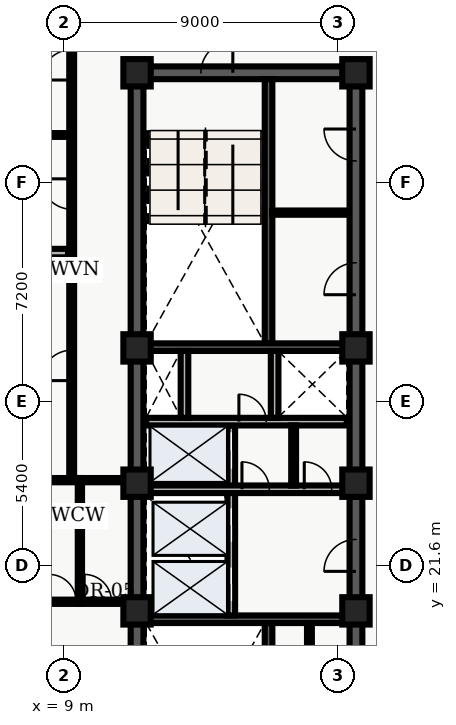
"""IFC4 building model, lengths in metres.
Left out: names, types, materials, properties, quantities, classifications, styles, units other than length and angle.
Written with IfcOpenShell. Run it as: python <this file> out.ifc"""

import sys

from ifc_helpers import new_model, entity, si_unit, converted_unit, direction, frame, origin_with_axes, origin_2d_with_axis, place, context, subcontext, project, spatial, polyline, rectangle, outline, extrude, element, fill, save


model = new_model("IFC4")
c1 = context("Model", 3, precision=1e-05, world=origin_with_axes(), true_north=direction((0.0, 1.0)))
c2 = subcontext(c1, "Body", "Model", "MODEL_VIEW")
j1 = project(units=[si_unit("LENGTHUNIT", "METRE"), converted_unit("PLANEANGLEUNIT", "DEGREE", entity("IfcPlaneAngleMeasure", 0.017), si_unit("PLANEANGLEUNIT", "RADIAN"), dimensions=[0, 0, 0, 0, 0, 0, 0])], contexts=[c1])
p1 = place(None, origin_with_axes())
s1 = spatial("IfcSite", under=j1, at=p1, CompositionType="ELEMENT")
p2 = place(p1, origin_with_axes())
s2 = spatial("IfcBuilding", under=s1, at=p2, CompositionType="ELEMENT")
p3 = place(p2, frame((0.0, 0.0, 240.3), z_axis=(0.0, 0.0, 1.0), x_axis=(1.0, 0.0, 0.0)))
s3 = spatial("IfcBuildingStorey", under=s2, at=p3, CompositionType="ELEMENT", Elevation=240.3)
p4 = place(p3, frame((11.4, 10.8, 0.0), z_axis=(0.0, 0.0, 1.0), x_axis=(0.0, 1.0, 0.0)))
e1 = element("IfcWall", 1, at=p4, inside=s3, PredefinedType="SHEAR", context=c2, shape_type="SweptSolid", body=[
    extrude(outline(polyline([(0.0, -0.21), (27.0, -0.21), (27.0, 0.21), (0.0, 0.21), (0.0, -0.21)])), origin_with_axes(), (0.0, 0.0, 1.0), 3.66),
])
p5 = place(p3, frame((11.4, 37.8, 0.0), z_axis=(0.0, 0.0, 1.0), x_axis=(1.0, 0.0, 0.0)))
e2 = element("IfcWall", 2, at=p5, inside=s3, PredefinedType="SHEAR", context=c2, shape_type="SweptSolid", body=[
    extrude(outline(polyline([(0.0, -0.21), (7.2, -0.21), (7.2, 0.21), (0.0, 0.21), (0.0, -0.21)])), origin_with_axes(), (0.0, 0.0, 1.0), 3.66),
])
p6 = place(p5, frame((2.625, 0.0, 0.0), z_axis=(0.0, 0.0, 1.0), x_axis=(1.0, 0.0, 0.0)))
e3 = element("IfcOpeningElement", 3, at=p6, cuts=e2, PredefinedType="OPENING", context=c2, shape_type="SweptSolid", body=[
    extrude(rectangle(XDim=1.05, YDim=0.44, at=origin_2d_with_axis()), origin_with_axes(), (0.0, 0.0, 1.0), 2.15),
])
p7 = place(p3, frame((18.6, 10.8, 0.0), z_axis=(0.0, 0.0, 1.0), x_axis=(0.0, 1.0, 0.0)))
e4 = element("IfcWall", 4, at=p7, inside=s3, PredefinedType="SHEAR", context=c2, shape_type="SweptSolid", body=[
    extrude(outline(polyline([(0.0, -0.21), (13.5, -0.21), (13.5, 0.21), (0.0, 0.21), (0.0, -0.21)])), origin_with_axes(), (0.0, 0.0, 1.0), 3.66),
])
p8 = place(p7, frame((1.3, 0.0, 0.0), z_axis=(0.0, 0.0, 1.0), x_axis=(1.0, 0.0, 0.0)))
e5 = element("IfcOpeningElement", 5, at=p8, cuts=e4, PredefinedType="OPENING", context=c2, shape_type="SweptSolid", body=[
    extrude(rectangle(XDim=1.1, YDim=0.44, at=origin_2d_with_axis()), origin_with_axes(), (0.0, 0.0, 1.0), 2.15),
])
p9 = place(p7, frame((3.4, 0.0, 0.0), z_axis=(0.0, 0.0, 1.0), x_axis=(1.0, 0.0, 0.0)))
e6 = element("IfcOpeningElement", 6, at=p9, cuts=e4, PredefinedType="OPENING", context=c2, shape_type="SweptSolid", body=[
    extrude(rectangle(XDim=1.1, YDim=0.44, at=origin_2d_with_axis()), origin_with_axes(), (0.0, 0.0, 1.0), 2.15),
])
p10 = place(p7, frame((11.125, 0.0, 0.0), z_axis=(0.0, 0.0, 1.0), x_axis=(1.0, 0.0, 0.0)))
e7 = element("IfcOpeningElement", 7, at=p10, cuts=e4, PredefinedType="OPENING", context=c2, shape_type="SweptSolid", body=[
    extrude(rectangle(XDim=1.05, YDim=0.44, at=origin_2d_with_axis()), origin_with_axes(), (0.0, 0.0, 1.0), 2.15),
])
p11 = place(p7, frame((6.675, 0.0, 0.0), z_axis=(0.0, 0.0, 1.0), x_axis=(1.0, 0.0, 0.0)))
e8 = element("IfcOpeningElement", 8, at=p11, cuts=e4, PredefinedType="OPENING", context=c2, shape_type="SweptSolid", body=[
    extrude(rectangle(XDim=0.95, YDim=0.44, at=origin_2d_with_axis()), origin_with_axes(), (0.0, 0.0, 1.0), 2.15),
])
p12 = place(p3, frame((18.6, 24.3, 0.0), z_axis=(0.0, 0.0, 1.0), x_axis=(0.0, 1.0, 0.0)))
e9 = element("IfcWall", 9, at=p12, inside=s3, PredefinedType="SHEAR", context=c2, shape_type="SweptSolid", body=[
    extrude(outline(polyline([(0.0, -0.21), (13.5, -0.21), (13.5, 0.21), (0.0, 0.21), (0.0, -0.21)])), origin_with_axes(), (0.0, 0.0, 1.0), 3.66),
])
p13 = place(p12, frame((6.725, 0.0, 0.0), z_axis=(0.0, 0.0, 1.0), x_axis=(1.0, 0.0, 0.0)))
e10 = element("IfcOpeningElement", 10, at=p13, cuts=e9, PredefinedType="OPENING", context=c2, shape_type="SweptSolid", body=[
    extrude(rectangle(XDim=1.05, YDim=0.44, at=origin_2d_with_axis()), origin_with_axes(), (0.0, 0.0, 1.0), 2.15),
])
p14 = place(p12, frame((11.125, 0.0, 0.0), z_axis=(0.0, 0.0, 1.0), x_axis=(1.0, 0.0, 0.0)))
e11 = element("IfcOpeningElement", 11, at=p14, cuts=e9, PredefinedType="OPENING", context=c2, shape_type="SweptSolid", body=[
    extrude(rectangle(XDim=1.05, YDim=0.44, at=origin_2d_with_axis()), origin_with_axes(), (0.0, 0.0, 1.0), 2.15),
])
p15 = place(p3, frame((15.725, 11.01, 0.0), z_axis=(0.0, 0.0, 1.0), x_axis=(0.0, 1.0, 0.0)))
e12 = element("IfcWall", 12, at=p15, inside=s3, PredefinedType="SHEAR", context=c2, shape_type="SweptSolid", body=[
    extrude(outline(polyline([(0.0, -0.125), (8.69, -0.125), (8.69, 0.125), (0.0, 0.125), (0.0, -0.125)])), origin_with_axes(), (0.0, 0.0, 1.0), 3.66),
])
p16 = place(p3, frame((11.61, 19.825, 0.0), z_axis=(0.0, 0.0, 1.0), x_axis=(1.0, 0.0, 0.0)))
e13 = element("IfcWall", 13, at=p16, inside=s3, PredefinedType="SHEAR", context=c2, shape_type="SweptSolid", body=[
    extrude(outline(polyline([(0.0, -0.125), (6.78, -0.125), (6.78, 0.125), (0.0, 0.125), (0.0, -0.125)])), origin_with_axes(), (0.0, 0.0, 1.0), 3.66),
])
p17 = place(p3, frame((15.725, 28.9, 0.0), z_axis=(0.0, 0.0, 1.0), x_axis=(0.0, 1.0, 0.0)))
e14 = element("IfcWall", 14, at=p17, inside=s3, PredefinedType="SHEAR", context=c2, shape_type="SweptSolid", body=[
    extrude(outline(polyline([(0.0, -0.125), (8.69, -0.125), (8.69, 0.125), (0.0, 0.125), (0.0, -0.125)])), origin_with_axes(), (0.0, 0.0, 1.0), 3.66),
])
p18 = place(p3, frame((11.61, 28.775, 0.0), z_axis=(0.0, 0.0, 1.0), x_axis=(1.0, 0.0, 0.0)))
e15 = element("IfcWall", 15, at=p18, inside=s3, PredefinedType="SHEAR", context=c2, shape_type="SweptSolid", body=[
    extrude(outline(polyline([(0.0, -0.125), (6.78, -0.125), (6.78, 0.125), (0.0, 0.125), (0.0, -0.125)])), origin_with_axes(), (0.0, 0.0, 1.0), 3.66),
])
p19 = place(p3, frame((14.5, 19.95, 0.0), z_axis=(0.0, 0.0, 1.0), x_axis=(0.0, 1.0, 0.0)))
e16 = element("IfcWall", 16, at=p19, inside=s3, PredefinedType="SOLIDWALL", context=c2, shape_type="SweptSolid", body=[
    extrude(outline(polyline([(0.0, -0.125), (6.25, -0.125), (6.25, 0.125), (0.0, 0.125), (0.0, -0.125)])), origin_with_axes(), (0.0, 0.0, 1.0), 2.7),
])
p20 = place(p19, frame((1.025, 0.0, 0.0), z_axis=(0.0, 0.0, 1.0), x_axis=(1.0, 0.0, 0.0)))
e17 = element("IfcOpeningElement", 17, at=p20, cuts=e16, PredefinedType="OPENING", context=c2, shape_type="SweptSolid", body=[
    extrude(rectangle(XDim=1.1, YDim=0.27, at=origin_2d_with_axis()), origin_with_axes(), (0.0, 0.0, 1.0), 2.15),
])
p21 = place(p19, frame((2.975, 0.0, 0.0), z_axis=(0.0, 0.0, 1.0), x_axis=(1.0, 0.0, 0.0)))
e18 = element("IfcOpeningElement", 18, at=p21, cuts=e16, PredefinedType="OPENING", context=c2, shape_type="SweptSolid", body=[
    extrude(rectangle(XDim=1.1, YDim=0.27, at=origin_2d_with_axis()), origin_with_axes(), (0.0, 0.0, 1.0), 2.15),
])
p22 = place(p19, frame((5.425, 0.0, 0.0), z_axis=(0.0, 0.0, 1.0), x_axis=(1.0, 0.0, 0.0)))
e19 = element("IfcOpeningElement", 19, at=p22, cuts=e16, PredefinedType="OPENING", context=c2, shape_type="SweptSolid", body=[
    extrude(rectangle(XDim=1.2, YDim=0.27, at=origin_2d_with_axis()), origin_with_axes(), (0.0, 0.0, 1.0), 2.15),
])
p23 = place(p3, frame((11.7, 24.1, 0.0), z_axis=(0.0, 0.0, 1.0), x_axis=(1.0, 0.0, 0.0)))
e20 = element("IfcWall", 20, at=p23, inside=s3, PredefinedType="SOLIDWALL", context=c2, shape_type="SweptSolid", body=[
    extrude(outline(polyline([(0.0, -0.125), (6.6, -0.125), (6.6, 0.125), (0.0, 0.125), (0.0, -0.125)])), origin_with_axes(), (0.0, 0.0, 1.0), 2.7),
])
p24 = place(p23, frame((3.6, 0.0, 0.0), z_axis=(0.0, 0.0, 1.0), x_axis=(1.0, 0.0, 0.0)))
e21 = element("IfcOpeningElement", 21, at=p24, cuts=e20, PredefinedType="OPENING", context=c2, shape_type="SweptSolid", body=[
    extrude(rectangle(XDim=0.9, YDim=0.27, at=origin_2d_with_axis()), origin_with_axes(), (0.0, 0.0, 1.0), 2.15),
])
p25 = place(p23, frame((5.65, 0.0, 0.0), z_axis=(0.0, 0.0, 1.0), x_axis=(1.0, 0.0, 0.0)))
e22 = element("IfcOpeningElement", 22, at=p25, cuts=e20, PredefinedType="OPENING", context=c2, shape_type="SweptSolid", body=[
    extrude(rectangle(XDim=0.9, YDim=0.27, at=origin_2d_with_axis()), origin_with_axes(), (0.0, 0.0, 1.0), 2.15),
])
p26 = place(p3, frame((11.7, 26.325, 0.0), z_axis=(0.0, 0.0, 1.0), x_axis=(1.0, 0.0, 0.0)))
e23 = element("IfcWall", 23, at=p26, inside=s3, PredefinedType="SOLIDWALL", context=c2, shape_type="SweptSolid", body=[
    extrude(outline(polyline([(0.0, -0.125), (6.6, -0.125), (6.6, 0.125), (0.0, 0.125), (0.0, -0.125)])), origin_with_axes(), (0.0, 0.0, 1.0), 2.7),
])
p27 = place(p26, frame((3.5, 0.0, 0.0), z_axis=(0.0, 0.0, 1.0), x_axis=(1.0, 0.0, 0.0)))
e24 = element("IfcOpeningElement", 24, at=p27, cuts=e23, PredefinedType="OPENING", context=c2, shape_type="SweptSolid", body=[
    extrude(rectangle(XDim=0.9, YDim=0.27, at=origin_2d_with_axis()), origin_with_axes(), (0.0, 0.0, 1.0), 2.15),
])
for number, where, z_axis, x_axis in (
    (25, (12.96, 26.45, 0.0), (0.0, 0.0, 1.0), (0.0, 1.0, 0.0)),
    (26, (15.925, 26.45, 0.0), (0.0, 0.0, 1.0), (0.0, 1.0, 0.0)),
):
    element("IfcWall", number, at=place(p3, frame(where, z_axis=z_axis, x_axis=x_axis)), inside=s3, PredefinedType="SOLIDWALL", context=c2, shape_type="SweptSolid", body=[
        extrude(outline(polyline([(0.0, -0.125), (2.2, -0.125), (2.2, 0.125), (0.0, 0.125), (0.0, -0.125)])), origin_with_axes(), (0.0, 0.0, 1.0), 2.7),
    ])
for number, where, z_axis, x_axis in (
    (27, (11.4, 20.1, 0.0), (0.0, 0.0, 1.0), (1.0, 0.0, 0.0)),
    (28, (11.4, 24.3, 0.0), (0.0, 0.0, 1.0), (1.0, 0.0, 0.0)),
    (29, (11.4, 28.75, 0.0), (0.0, 0.0, 1.0), (1.0, 0.0, 0.0)),
    (30, (11.4, 37.8, 0.0), (0.0, 0.0, 1.0), (1.0, 0.0, 0.0)),
    (31, (18.6, 20.1, 0.0), (0.0, 0.0, 1.0), (1.0, 0.0, 0.0)),
    (32, (18.6, 24.3, 0.0), (0.0, 0.0, 1.0), (1.0, 0.0, 0.0)),
    (33, (18.6, 28.75, 0.0), (0.0, 0.0, 1.0), (1.0, 0.0, 0.0)),
    (34, (18.6, 37.8, 0.0), (0.0, 0.0, 1.0), (1.0, 0.0, 0.0)),
):
    element("IfcColumn", number, at=place(p3, frame(where, z_axis=z_axis, x_axis=x_axis)), inside=s3, PredefinedType="COLUMN", context=c2, shape_type="SweptSolid", body=[
        extrude(rectangle(XDim=0.9, YDim=0.9, at=origin_2d_with_axis()), origin_with_axes(), (0.0, 0.0, 1.0), 3.9),
    ])
p28 = place(p3, frame((16.55, 24.22, 0.0), z_axis=(0.0, 0.0, 1.0), x_axis=(0.0, 1.0, 0.0)))
e35 = element("IfcWall", 35, at=p28, inside=s3, PredefinedType="PARTITIONING", context=c2, shape_type="SweptSolid", body=[
    extrude(outline(polyline([(0.0, -0.08), (1.98, -0.08), (1.98, 0.08), (0.0, 0.08), (0.0, -0.08)])), origin_with_axes(), (0.0, 0.0, 1.0), 2.7),
])
p29 = place(p3, frame((17.07, 15.34, 0.0), z_axis=(0.0, 0.0, 1.0), x_axis=(0.0, 1.0, 0.0)))
e36 = element("IfcWall", 36, at=p29, inside=s3, PredefinedType="PARTITIONING", context=c2, shape_type="SweptSolid", body=[
    extrude(outline(polyline([(0.0, -0.08), (4.36, -0.08), (4.36, 0.08), (0.0, 0.08), (0.0, -0.08)])), origin_with_axes(), (0.0, 0.0, 1.0), 2.7),
])
p30 = place(p29, frame((2.05, 0.0, 0.0), z_axis=(0.0, 0.0, 1.0), x_axis=(1.0, 0.0, 0.0)))
e37 = element("IfcOpeningElement", 37, at=p30, cuts=e36, PredefinedType="OPENING", context=c2, shape_type="SweptSolid", body=[
    extrude(rectangle(XDim=0.9, YDim=0.18, at=origin_2d_with_axis()), origin_with_axes(), (0.0, 0.0, 1.0), 2.15),
])
p31 = place(p3, frame((15.84, 33.2, 0.0), z_axis=(0.0, 0.0, 1.0), x_axis=(1.0, 0.0, 0.0)))
e38 = element("IfcWall", 38, at=p31, inside=s3, PredefinedType="PARTITIONING", context=c2, shape_type="SweptSolid", body=[
    extrude(outline(polyline([(0.0, -0.07), (2.46, -0.07), (2.46, 0.07), (0.0, 0.07), (0.0, -0.07)])), origin_with_axes(), (0.0, 0.0, 1.0), 2.7),
])
p32 = place(p3, frame((9.52, 20.4, 0.0), z_axis=(0.0, 0.0, 1.0), x_axis=(0.0, 1.0, 0.0)))
e39 = element("IfcWall", 39, at=p32, inside=s3, PredefinedType="PARTITIONING", context=c2, shape_type="SweptSolid", body=[
    extrude(outline(polyline([(0.0, -0.07), (4.0, -0.07), (4.0, 0.07), (0.0, 0.07), (0.0, -0.07)])), origin_with_axes(), (0.0, 0.0, 1.0), 2.7),
])
p33 = place(p3, frame((9.52, 20.4, 0.0), z_axis=(0.0, 0.0, 1.0), x_axis=(1.0, 0.0, 0.0)))
e40 = element("IfcWall", 40, at=p33, inside=s3, PredefinedType="PARTITIONING", context=c2, shape_type="SweptSolid", body=[
    extrude(outline(polyline([(0.0, -0.07), (1.58, -0.07), (1.58, 0.07), (0.0, 0.07), (0.0, -0.07)])), origin_with_axes(), (0.0, 0.0, 1.0), 2.7),
])
p34 = place(p33, frame((0.59, 0.0, 0.0), z_axis=(0.0, 0.0, 1.0), x_axis=(1.0, 0.0, 0.0)))
e41 = element("IfcOpeningElement", 41, at=p34, cuts=e40, PredefinedType="OPENING", context=c2, shape_type="SweptSolid", body=[
    extrude(rectangle(XDim=0.9, YDim=0.16, at=origin_2d_with_axis()), origin_with_axes(), (0.0, 0.0, 1.0), 2.15),
])
p35 = place(p3, frame((9.52, 24.4, 0.0), z_axis=(0.0, 0.0, 1.0), x_axis=(1.0, 0.0, 0.0)))
e42 = element("IfcWall", 42, at=p35, inside=s3, PredefinedType="PARTITIONING", context=c2, shape_type="SweptSolid", body=[
    extrude(outline(polyline([(0.0, -0.07), (1.58, -0.07), (1.58, 0.07), (0.0, 0.07), (0.0, -0.07)])), origin_with_axes(), (0.0, 0.0, 1.0), 2.7),
])
p36 = place(p3, frame((9.25, 24.4, 0.0), z_axis=(0.0, 0.0, 1.0), x_axis=(0.0, 1.0, 0.0)))
e43 = element("IfcWall", 43, at=p36, inside=s3, PredefinedType="PARTITIONING", context=c2, shape_type="SweptSolid", body=[
    extrude(outline(polyline([(0.0, -0.08), (16.1, -0.08), (16.1, 0.08), (0.0, 0.08), (0.0, -0.08)])), origin_with_axes(), (0.0, 0.0, 1.0), 2.7),
])
p37 = place(p36, frame((3.775, 0.0, 0.0), z_axis=(0.0, 0.0, 1.0), x_axis=(1.0, 0.0, 0.0)))
e44 = element("IfcOpeningElement", 44, at=p37, cuts=e43, PredefinedType="OPENING", context=c2, shape_type="SweptSolid", body=[
    extrude(rectangle(XDim=1.0, YDim=0.18, at=origin_2d_with_axis()), origin_with_axes(), (0.0, 0.0, 1.0), 2.15),
])
p38 = place(p36, frame((9.412, 0.0, 0.0), z_axis=(0.0, 0.0, 1.0), x_axis=(1.0, 0.0, 0.0)))
e45 = element("IfcOpeningElement", 45, at=p38, cuts=e43, PredefinedType="OPENING", context=c2, shape_type="SweptSolid", body=[
    extrude(rectangle(XDim=1.0, YDim=0.18, at=origin_2d_with_axis()), origin_with_axes(), (0.0, 0.0, 1.0), 2.15),
])
p39 = place(p36, frame((13.662, 0.0, 0.0), z_axis=(0.0, 0.0, 1.0), x_axis=(1.0, 0.0, 0.0)))
e46 = element("IfcOpeningElement", 46, at=p39, cuts=e43, PredefinedType="OPENING", context=c2, shape_type="SweptSolid", body=[
    extrude(rectangle(XDim=1.0, YDim=0.18, at=origin_2d_with_axis()), origin_with_axes(), (0.0, 0.0, 1.0), 2.15),
])
p40 = place(p3, frame((4.835, 20.4, 0.0), z_axis=(0.0, 0.0, 1.0), x_axis=(1.0, 0.0, 0.0)))
e47 = element("IfcWall", 47, at=p40, inside=s3, PredefinedType="PARTITIONING", context=c2, shape_type="SweptSolid", body=[
    extrude(outline(polyline([(0.0, -0.07), (4.685, -0.07), (4.685, 0.07), (0.0, 0.07), (0.0, -0.07)])), origin_with_axes(), (0.0, 0.0, 1.0), 2.7),
])
p41 = place(p40, frame((4.115, 0.0, 0.0), z_axis=(0.0, 0.0, 1.0), x_axis=(1.0, 0.0, 0.0)))
e48 = element("IfcOpeningElement", 48, at=p41, cuts=e47, PredefinedType="OPENING", context=c2, shape_type="SweptSolid", body=[
    extrude(rectangle(XDim=0.9, YDim=0.16, at=origin_2d_with_axis()), origin_with_axes(), (0.0, 0.0, 1.0), 2.15),
])
p42 = place(p3, frame((4.835, 24.4, 0.0), z_axis=(0.0, 0.0, 1.0), x_axis=(1.0, 0.0, 0.0)))
e49 = element("IfcWall", 49, at=p42, inside=s3, PredefinedType="PARTITIONING", context=c2, shape_type="SweptSolid", body=[
    extrude(outline(polyline([(0.0, -0.07), (4.685, -0.07), (4.685, 0.07), (0.0, 0.07), (0.0, -0.07)])), origin_with_axes(), (0.0, 0.0, 1.0), 2.7),
])
p43 = place(p3, frame((4.835, 31.869, 0.0), z_axis=(0.0, 0.0, 1.0), x_axis=(1.0, 0.0, 0.0)))
e50 = element("IfcWall", 50, at=p43, inside=s3, PredefinedType="PARTITIONING", context=c2, shape_type="SweptSolid", body=[
    extrude(outline(polyline([(0.0, -0.14), (4.295, -0.14), (4.295, 0.14), (0.0, 0.14), (0.0, -0.14)])), origin_with_axes(), (0.0, 0.0, 1.0), 2.7),
])
p44 = place(p3, frame((4.835, 35.754, 0.0), z_axis=(0.0, 0.0, 1.0), x_axis=(1.0, 0.0, 0.0)))
e51 = element("IfcWall", 51, at=p44, inside=s3, PredefinedType="PARTITIONING", context=c2, shape_type="SweptSolid", body=[
    extrude(outline(polyline([(0.0, -0.062), (4.295, -0.062), (4.295, 0.062), (0.0, 0.062), (0.0, -0.062)])), origin_with_axes(), (0.0, 0.0, 1.0), 2.7),
])
p45 = place(p19, frame((1.025, 0.0, 0.0), z_axis=(0.0, 0.0, 1.0), x_axis=(1.0, 0.0, 0.0)))
e52 = element("IfcDoor", 52, at=p45, inside=s3, OperationType="SLIDING_TO_LEFT", PredefinedType="DOOR", context=c2, shape_type="SweptSolid", body=[
    extrude(rectangle(XDim=1.1, YDim=0.09, at=origin_2d_with_axis()), origin_with_axes(), (0.0, 0.0, 1.0), 2.15),
])
fill(e17, e52)
p46 = place(p19, frame((2.975, 0.0, 0.0), z_axis=(0.0, 0.0, 1.0), x_axis=(1.0, 0.0, 0.0)))
e53 = element("IfcDoor", 53, at=p46, inside=s3, OperationType="SLIDING_TO_RIGHT", PredefinedType="DOOR", context=c2, shape_type="SweptSolid", body=[
    extrude(rectangle(XDim=1.1, YDim=0.09, at=origin_2d_with_axis()), origin_with_axes(), (0.0, 0.0, 1.0), 2.15),
])
fill(e18, e53)
p47 = place(p19, frame((5.425, 0.0, 0.0), z_axis=(0.0, 0.0, 1.0), x_axis=(1.0, 0.0, 0.0)))
e54 = element("IfcDoor", 54, at=p47, inside=s3, OperationType="DOUBLE_DOOR_SLIDING", PredefinedType="DOOR", context=c2, shape_type="SweptSolid", body=[
    extrude(rectangle(XDim=1.2, YDim=0.09, at=origin_2d_with_axis()), origin_with_axes(), (0.0, 0.0, 1.0), 2.15),
])
fill(e19, e54)
p48 = place(p5, frame((2.625, 0.0, 0.0), z_axis=(0.0, 0.0, 1.0), x_axis=(1.0, 0.0, 0.0)))
e55 = element("IfcDoor", 55, at=p48, inside=s3, OperationType="SINGLE_SWING_RIGHT", PredefinedType="DOOR", context=c2, shape_type="SweptSolid", body=[
    extrude(rectangle(XDim=1.05, YDim=0.09, at=origin_2d_with_axis()), origin_with_axes(), (0.0, 0.0, 1.0), 2.15),
])
fill(e3, e55)
p49 = place(p7, frame((11.125, 0.0, 0.0), z_axis=(0.0, 0.0, 1.0), x_axis=(1.0, 0.0, 0.0)))
e56 = element("IfcDoor", 56, at=p49, inside=s3, OperationType="SINGLE_SWING_LEFT", PredefinedType="DOOR", context=c2, shape_type="SweptSolid", body=[
    extrude(rectangle(XDim=1.05, YDim=0.09, at=origin_2d_with_axis()), origin_with_axes(), (0.0, 0.0, 1.0), 2.15),
])
fill(e7, e56)
p50 = place(p23, frame((3.6, 0.0, 0.0), z_axis=(0.0, 0.0, 1.0), x_axis=(1.0, 0.0, 0.0)))
e57 = element("IfcDoor", 57, at=p50, inside=s3, OperationType="SINGLE_SWING_LEFT", PredefinedType="DOOR", context=c2, shape_type="SweptSolid", body=[
    extrude(rectangle(XDim=0.9, YDim=0.09, at=origin_2d_with_axis()), origin_with_axes(), (0.0, 0.0, 1.0), 2.15),
])
fill(e21, e57)
p51 = place(p23, frame((5.65, 0.0, 0.0), z_axis=(0.0, 0.0, 1.0), x_axis=(1.0, 0.0, 0.0)))
e58 = element("IfcDoor", 58, at=p51, inside=s3, OperationType="SINGLE_SWING_LEFT", PredefinedType="DOOR", context=c2, shape_type="SweptSolid", body=[
    extrude(rectangle(XDim=0.9, YDim=0.09, at=origin_2d_with_axis()), origin_with_axes(), (0.0, 0.0, 1.0), 2.15),
])
fill(e22, e58)
p52 = place(p26, frame((3.5, 0.0, 0.0), z_axis=(0.0, 0.0, 1.0), x_axis=(1.0, 0.0, 0.0)))
e59 = element("IfcDoor", 59, at=p52, inside=s3, OperationType="SINGLE_SWING_LEFT", PredefinedType="DOOR", context=c2, shape_type="SweptSolid", body=[
    extrude(rectangle(XDim=0.9, YDim=0.09, at=origin_2d_with_axis()), origin_with_axes(), (0.0, 0.0, 1.0), 2.15),
])
fill(e24, e59)
p53 = place(p12, frame((6.725, 0.0, 0.0), z_axis=(0.0, 0.0, 1.0), x_axis=(1.0, 0.0, 0.0)))
e60 = element("IfcDoor", 60, at=p53, inside=s3, OperationType="SINGLE_SWING_LEFT", PredefinedType="DOOR", context=c2, shape_type="SweptSolid", body=[
    extrude(rectangle(XDim=1.05, YDim=0.09, at=origin_2d_with_axis()), origin_with_axes(), (0.0, 0.0, 1.0), 2.15),
])
fill(e10, e60)
p54 = place(p12, frame((11.125, 0.0, 0.0), z_axis=(0.0, 0.0, 1.0), x_axis=(1.0, 0.0, 0.0)))
e61 = element("IfcDoor", 61, at=p54, inside=s3, OperationType="SINGLE_SWING_RIGHT", PredefinedType="DOOR", context=c2, shape_type="SweptSolid", body=[
    extrude(rectangle(XDim=1.05, YDim=0.09, at=origin_2d_with_axis()), origin_with_axes(), (0.0, 0.0, 1.0), 2.15),
])
fill(e11, e61)
p55 = place(p33, frame((0.59, 0.0, 0.0), z_axis=(0.0, 0.0, 1.0), x_axis=(1.0, 0.0, 0.0)))
e62 = element("IfcDoor", 62, at=p55, inside=s3, OperationType="SINGLE_SWING_LEFT", PredefinedType="DOOR", context=c2, shape_type="SweptSolid", body=[
    extrude(rectangle(XDim=0.9, YDim=0.084, at=origin_2d_with_axis()), origin_with_axes(), (0.0, 0.0, 1.0), 2.15),
])
fill(e41, e62)
p56 = place(p40, frame((4.115, 0.0, 0.0), z_axis=(0.0, 0.0, 1.0), x_axis=(1.0, 0.0, 0.0)))
e63 = element("IfcDoor", 63, at=p56, inside=s3, OperationType="SINGLE_SWING_LEFT", PredefinedType="DOOR", context=c2, shape_type="SweptSolid", body=[
    extrude(rectangle(XDim=0.9, YDim=0.084, at=origin_2d_with_axis()), origin_with_axes(), (0.0, 0.0, 1.0), 2.15),
])
fill(e48, e63)
p57 = place(p36, frame((3.775, 0.0, 0.0), z_axis=(0.0, 0.0, 1.0), x_axis=(1.0, 0.0, 0.0)))
e64 = element("IfcDoor", 64, at=p57, inside=s3, OperationType="SINGLE_SWING_LEFT", PredefinedType="DOOR", context=c2, shape_type="SweptSolid", body=[
    extrude(rectangle(XDim=1.0, YDim=0.09, at=origin_2d_with_axis()), origin_with_axes(), (0.0, 0.0, 1.0), 2.15),
])
fill(e44, e64)
p58 = place(p36, frame((9.412, 0.0, 0.0), z_axis=(0.0, 0.0, 1.0), x_axis=(1.0, 0.0, 0.0)))
e65 = element("IfcDoor", 65, at=p58, inside=s3, OperationType="SINGLE_SWING_RIGHT", PredefinedType="DOOR", context=c2, shape_type="SweptSolid", body=[
    extrude(rectangle(XDim=1.0, YDim=0.09, at=origin_2d_with_axis()), origin_with_axes(), (0.0, 0.0, 1.0), 2.15),
])
fill(e45, e65)
p59 = place(p36, frame((13.662, 0.0, 0.0), z_axis=(0.0, 0.0, 1.0), x_axis=(1.0, 0.0, 0.0)))
e66 = element("IfcDoor", 66, at=p59, inside=s3, OperationType="SINGLE_SWING_LEFT", PredefinedType="DOOR", context=c2, shape_type="SweptSolid", body=[
    extrude(rectangle(XDim=1.0, YDim=0.09, at=origin_2d_with_axis()), origin_with_axes(), (0.0, 0.0, 1.0), 2.15),
])
fill(e46, e66)
save(model, sys.argv[1])
